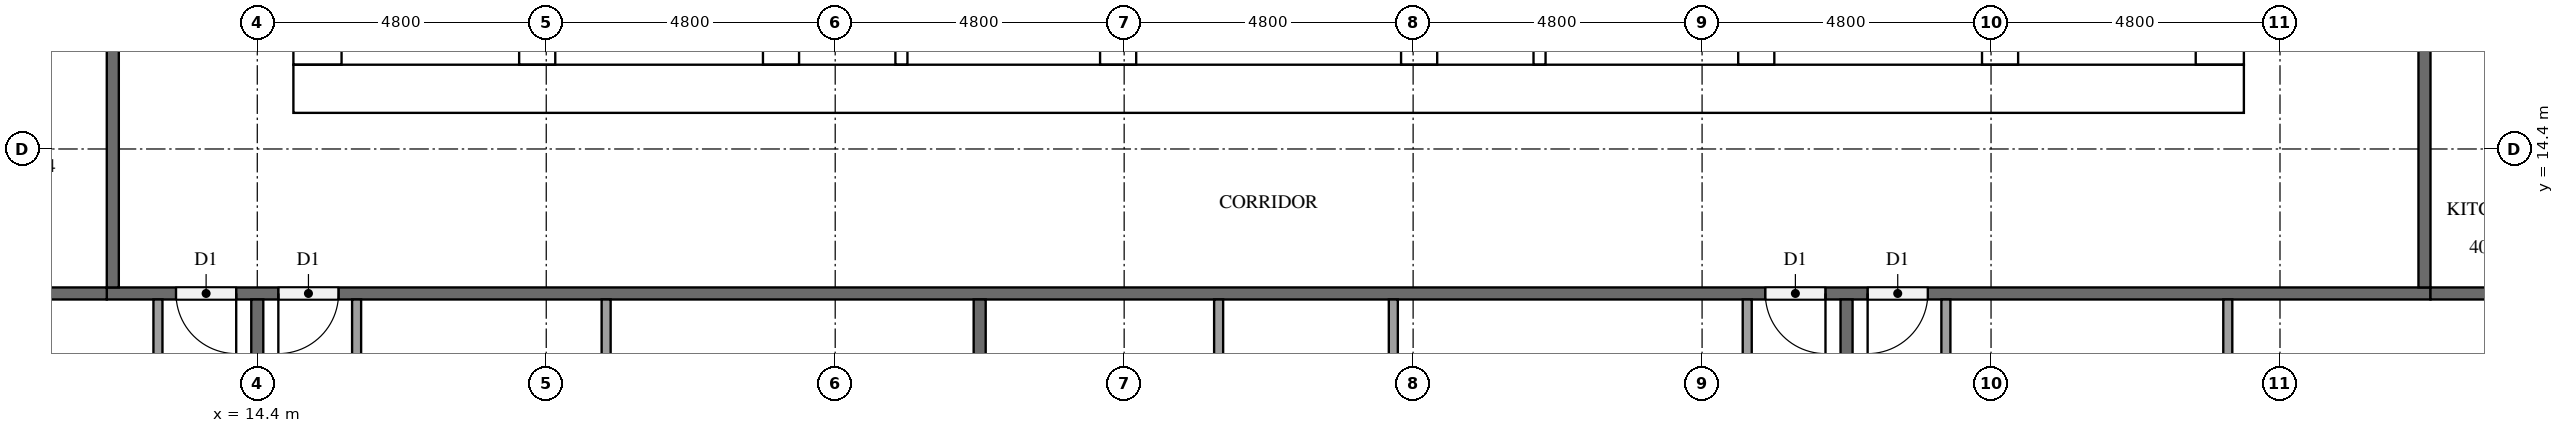
"""IFC4 building model, lengths in metres.
Left out: names, types, materials, properties, quantities, classifications, styles, units other than length and angle.
Written with IfcOpenShell. Run it as: python <this file> out.ifc"""

import sys

from ifc_helpers import new_model, si_unit, direction, frame, frame_2d, origin, place, context, subcontext, project, spatial, rectangle, extrude, element, fill, save


model = new_model("IFC4")
c1 = context("Model", 3, precision=1e-05, world=origin(), true_north=direction((0.0, 1.0)))
c2 = subcontext(c1, "Body", "Model", "MODEL_VIEW")
j1 = project(units=[si_unit("LENGTHUNIT", "METRE"), si_unit("PLANEANGLEUNIT", "RADIAN")], contexts=[c1])
p1 = place(None, origin())
s1 = spatial("IfcSite", under=j1, at=p1, CompositionType="ELEMENT")
p2 = place(p1, origin())
s2 = spatial("IfcBuilding", under=s1, at=p2, CompositionType="ELEMENT")
p3 = place(p2, frame((0.0, 0.0, 156.0)))
s3 = spatial("IfcBuildingStorey", under=s2, at=p3, CompositionType="ELEMENT", Elevation=156.0)
p4 = place(p3, frame((15.0, 15.4, 0.0), z_axis=(0.0, 0.0, 1.0), x_axis=(1.0, 0.0, 0.0)))
e1 = element("IfcWall", 1, at=p4, inside=s3, PredefinedType="SHEAR", context=c2, shape_type="SweptSolid", body=[
    extrude(rectangle(XDim=32.4, YDim=0.8, at=frame_2d((16.2, 0.0))), origin(), (0.0, 0.0, 1.0), 3.2),
])
p5 = place(p4, frame((15.3, 0.0, 0.0)))
e2 = element("IfcOpeningElement", 2, at=p5, cuts=e1, PredefinedType="OPENING", context=c2, shape_type="SweptSolid", body=[
    extrude(rectangle(XDim=1.8, YDim=2.1, at=frame_2d((0.9, 1.05))), frame((0.0, 0.41, 0.0), z_axis=(0.0, -1.0, 0.0), x_axis=(1.0, 0.0, 0.0)), (0.0, 0.0, 1.0), 0.82),
])
p6 = place(p3, frame((15.4, 15.8, 0.0), z_axis=(0.0, 0.0, 1.0), x_axis=(0.0, 1.0, 0.0)))
e3 = element("IfcWall", 3, at=p6, inside=s3, PredefinedType="SHEAR", context=c2, shape_type="SweptSolid", body=[
    extrude(rectangle(XDim=21.2, YDim=0.8, at=frame_2d((10.6, 0.0))), origin(), (0.0, 0.0, 1.0), 3.2),
])
p7 = place(p6, frame((4.96, 0.0, 0.0)))
e4 = element("IfcOpeningElement", 4, at=p7, cuts=e3, PredefinedType="OPENING", context=c2, shape_type="SweptSolid", body=[
    extrude(rectangle(XDim=1.2, YDim=2.1, at=frame_2d((0.6, 1.05))), frame((0.0, 0.41, 0.0), z_axis=(0.0, -1.0, 0.0), x_axis=(1.0, 0.0, 0.0)), (0.0, 0.0, 1.0), 0.82),
])
p8 = place(p3, frame((47.0, 15.8, 0.0), z_axis=(0.0, 0.0, 1.0), x_axis=(0.0, 1.0, 0.0)))
e5 = element("IfcWall", 5, at=p8, inside=s3, PredefinedType="SHEAR", context=c2, shape_type="SweptSolid", body=[
    extrude(rectangle(XDim=21.2, YDim=0.8, at=frame_2d((10.6, 0.0))), origin(), (0.0, 0.0, 1.0), 3.2),
])
p9 = place(p8, frame((10.3, 0.0, 0.0)))
e6 = element("IfcOpeningElement", 6, at=p9, cuts=e5, PredefinedType="OPENING", context=c2, shape_type="SweptSolid", body=[
    extrude(rectangle(XDim=1.2, YDim=2.1, at=frame_2d((0.6, 1.05))), frame((0.0, 0.41, 0.0), z_axis=(0.0, -1.0, 0.0), x_axis=(1.0, 0.0, 0.0)), (0.0, 0.0, 1.0), 0.82),
])
p10 = place(p3, frame((19.05, 15.8, 0.0), z_axis=(0.0, 0.0, 1.0), x_axis=(0.0, 1.0, 0.0)))
e7 = element("IfcWall", 7, at=p10, inside=s3, PredefinedType="SHEAR", context=c2, shape_type="SweptSolid", body=[
    extrude(rectangle(XDim=15.15, YDim=0.6, at=frame_2d((7.575, 0.0))), origin(), (0.0, 0.0, 1.0), 3.2),
])
p11 = place(p10, frame((9.65, 0.0, 0.0)))
e8 = element("IfcOpeningElement", 8, at=p11, cuts=e7, PredefinedType="OPENING", context=c2, shape_type="SweptSolid", body=[
    extrude(rectangle(XDim=1.1, YDim=2.1, at=frame_2d((0.55, 1.05))), frame((0.0, 0.31, 0.0), z_axis=(0.0, -1.0, 0.0), x_axis=(1.0, 0.0, 0.0)), (0.0, 0.0, 1.0), 0.62),
])
p12 = place(p10, frame((13.15, 0.0, 0.0)))
e9 = element("IfcOpeningElement", 9, at=p12, cuts=e7, PredefinedType="OPENING", context=c2, shape_type="SweptSolid", body=[
    extrude(rectangle(XDim=1.1, YDim=2.1, at=frame_2d((0.55, 1.05))), frame((0.0, 0.31, 0.0), z_axis=(0.0, -1.0, 0.0), x_axis=(1.0, 0.0, 0.0)), (0.0, 0.0, 1.0), 0.62),
])
p13 = place(p10, frame((0.4, 0.0, 0.0)))
e10 = element("IfcOpeningElement", 10, at=p13, cuts=e7, PredefinedType="OPENING", context=c2, shape_type="SweptSolid", body=[
    extrude(rectangle(XDim=1.2, YDim=2.1, at=frame_2d((0.6, 1.05))), frame((0.0, 0.31, 0.0), z_axis=(0.0, -1.0, 0.0), x_axis=(1.0, 0.0, 0.0)), (0.0, 0.0, 1.0), 0.62),
])
p14 = place(p3, frame((23.1, 15.8, 0.0), z_axis=(0.0, 0.0, 1.0), x_axis=(0.0, 1.0, 0.0)))
e11 = element("IfcWall", 11, at=p14, inside=s3, PredefinedType="SHEAR", context=c2, shape_type="SweptSolid", body=[
    extrude(rectangle(XDim=21.2, YDim=0.6, at=frame_2d((10.6, 0.0))), origin(), (0.0, 0.0, 1.0), 3.2),
])
p15 = place(p3, frame((39.3, 15.8, 0.0), z_axis=(0.0, 0.0, 1.0), x_axis=(0.0, 1.0, 0.0)))
e12 = element("IfcWall", 12, at=p15, inside=s3, PredefinedType="SHEAR", context=c2, shape_type="SweptSolid", body=[
    extrude(rectangle(XDim=8.45, YDim=0.6, at=frame_2d((4.225, 0.0))), origin(), (0.0, 0.0, 1.0), 3.2),
])
p16 = place(p3, frame((43.35, 15.8, 0.0), z_axis=(0.0, 0.0, 1.0), x_axis=(0.0, 1.0, 0.0)))
e13 = element("IfcWall", 13, at=p16, inside=s3, PredefinedType="SHEAR", context=c2, shape_type="SweptSolid", body=[
    extrude(rectangle(XDim=8.45, YDim=0.6, at=frame_2d((4.225, 0.0))), origin(), (0.0, 0.0, 1.0), 3.2),
])
p17 = place(p16, frame((0.4, 0.0, 0.0)))
e14 = element("IfcOpeningElement", 14, at=p17, cuts=e13, PredefinedType="OPENING", context=c2, shape_type="SweptSolid", body=[
    extrude(rectangle(XDim=1.2, YDim=2.1, at=frame_2d((0.6, 1.05))), frame((0.0, 0.31, 0.0), z_axis=(0.0, -1.0, 0.0), x_axis=(1.0, 0.0, 0.0)), (0.0, 0.0, 1.0), 0.62),
])
for number, where, z_axis, x_axis in (
    (15, (28.7, 15.8, 0.0), (0.0, 0.0, 1.0), (0.0, 1.0, 0.0)),
    (16, (33.7, 15.8, 0.0), (0.0, 0.0, 1.0), (0.0, 1.0, 0.0)),
):
    element("IfcWall", number, at=place(p3, frame(where, z_axis=z_axis, x_axis=x_axis)), inside=s3, PredefinedType="SHEAR", context=c2, shape_type="SweptSolid", body=[
        extrude(rectangle(XDim=2.65, YDim=0.6, at=frame_2d((1.325, 0.0))), origin(), (0.0, 0.0, 1.0), 3.2),
    ])
for number, where, z_axis, x_axis in (
    (17, (25.1, 15.8, 0.0), (0.0, 0.0, 1.0), (0.0, 1.0, 0.0)),
    (18, (35.7, 15.8, 0.0), (0.0, 0.0, 1.0), (0.0, 1.0, 0.0)),
):
    element("IfcWall", number, at=place(p3, frame(where, z_axis=z_axis, x_axis=x_axis)), inside=s3, PredefinedType="PARTITIONING", context=c2, shape_type="SweptSolid", body=[
        extrude(rectangle(XDim=2.65, YDim=0.2, at=frame_2d((1.325, 0.0))), origin(), (0.0, 0.0, 1.0), 3.2),
    ])
p18 = place(p3, frame((50.5, 12.0, 0.0), z_axis=(0.0, 0.0, 1.0), x_axis=(-1.0, 0.0, 0.0)))
e19 = element("IfcWall", 19, at=p18, inside=s3, PredefinedType="PARTITIONING", context=c2, shape_type="SweptSolid", body=[
    extrude(rectangle(XDim=38.6, YDim=0.2, at=frame_2d((19.3, 0.0))), origin(), (0.0, 0.0, 1.0), 3.2),
])
p19 = place(p18, frame((36.45, 0.0, 0.0)))
e20 = element("IfcOpeningElement", 20, at=p19, cuts=e19, PredefinedType="OPENING", context=c2, shape_type="SweptSolid", body=[
    extrude(rectangle(XDim=1.0, YDim=2.1, at=frame_2d((0.5, 1.05))), frame((0.0, 0.11, 0.0), z_axis=(0.0, -1.0, 0.0), x_axis=(1.0, 0.0, 0.0)), (0.0, 0.0, 1.0), 0.22),
])
p20 = place(p18, frame((34.75, 0.0, 0.0)))
e21 = element("IfcOpeningElement", 21, at=p20, cuts=e19, PredefinedType="OPENING", context=c2, shape_type="SweptSolid", body=[
    extrude(rectangle(XDim=1.0, YDim=2.1, at=frame_2d((0.5, 1.05))), frame((0.0, 0.11, 0.0), z_axis=(0.0, -1.0, 0.0), x_axis=(1.0, 0.0, 0.0)), (0.0, 0.0, 1.0), 0.22),
])
p21 = place(p18, frame((10.05, 0.0, 0.0)))
e22 = element("IfcOpeningElement", 22, at=p21, cuts=e19, PredefinedType="OPENING", context=c2, shape_type="SweptSolid", body=[
    extrude(rectangle(XDim=1.0, YDim=2.1, at=frame_2d((0.5, 1.05))), frame((0.0, 0.11, 0.0), z_axis=(0.0, -1.0, 0.0), x_axis=(1.0, 0.0, 0.0)), (0.0, 0.0, 1.0), 0.22),
])
p22 = place(p18, frame((8.35, 0.0, 0.0)))
e23 = element("IfcOpeningElement", 23, at=p22, cuts=e19, PredefinedType="OPENING", context=c2, shape_type="SweptSolid", body=[
    extrude(rectangle(XDim=1.0, YDim=2.1, at=frame_2d((0.5, 1.05))), frame((0.0, 0.11, 0.0), z_axis=(0.0, -1.0, 0.0), x_axis=(1.0, 0.0, 0.0)), (0.0, 0.0, 1.0), 0.22),
])
p23 = place(p3, frame((50.4, 40.7, 0.0), z_axis=(0.0, 0.0, 1.0), x_axis=(0.0, -1.0, 0.0)))
e24 = element("IfcWall", 24, at=p23, inside=s3, PredefinedType="PARTITIONING", context=c2, shape_type="SweptSolid", body=[
    extrude(rectangle(XDim=28.6, YDim=0.2, at=frame_2d((14.3, 0.0))), origin(), (0.0, 0.0, 1.0), 3.2),
])
p24 = place(p23, frame((17.05, 0.0, 0.0)))
e25 = element("IfcOpeningElement", 25, at=p24, cuts=e24, PredefinedType="OPENING", context=c2, shape_type="SweptSolid", body=[
    extrude(rectangle(XDim=1.0, YDim=2.1, at=frame_2d((0.5, 1.05))), frame((0.0, 0.11, 0.0), z_axis=(0.0, -1.0, 0.0), x_axis=(1.0, 0.0, 0.0)), (0.0, 0.0, 1.0), 0.22),
])
p25 = place(p23, frame((15.35, 0.0, 0.0)))
e26 = element("IfcOpeningElement", 26, at=p25, cuts=e24, PredefinedType="OPENING", context=c2, shape_type="SweptSolid", body=[
    extrude(rectangle(XDim=1.0, YDim=2.1, at=frame_2d((0.5, 1.05))), frame((0.0, 0.11, 0.0), z_axis=(0.0, -1.0, 0.0), x_axis=(1.0, 0.0, 0.0)), (0.0, 0.0, 1.0), 0.22),
])
p26 = place(p23, frame((5.75, 0.0, 0.0)))
e27 = element("IfcOpeningElement", 27, at=p26, cuts=e24, PredefinedType="OPENING", context=c2, shape_type="SweptSolid", body=[
    extrude(rectangle(XDim=1.0, YDim=2.1, at=frame_2d((0.5, 1.05))), frame((0.0, 0.11, 0.0), z_axis=(0.0, -1.0, 0.0), x_axis=(1.0, 0.0, 0.0)), (0.0, 0.0, 1.0), 0.22),
])
p27 = place(p3, frame((12.0, 12.1, 0.0), z_axis=(0.0, 0.0, 1.0), x_axis=(0.0, 1.0, 0.0)))
e28 = element("IfcWall", 28, at=p27, inside=s3, PredefinedType="PARTITIONING", context=c2, shape_type="SweptSolid", body=[
    extrude(rectangle(XDim=28.6, YDim=0.2, at=frame_2d((14.3, 0.0))), origin(), (0.0, 0.0, 1.0), 3.2),
])
p28 = place(p27, frame((27.35, 0.0, 0.0)))
e29 = element("IfcOpeningElement", 29, at=p28, cuts=e28, PredefinedType="OPENING", context=c2, shape_type="SweptSolid", body=[
    extrude(rectangle(XDim=1.0, YDim=2.1, at=frame_2d((0.5, 1.05))), frame((0.0, 0.11, 0.0), z_axis=(0.0, -1.0, 0.0), x_axis=(1.0, 0.0, 0.0)), (0.0, 0.0, 1.0), 0.22),
])
p29 = place(p27, frame((20.15, 0.0, 0.0)))
e30 = element("IfcOpeningElement", 30, at=p29, cuts=e28, PredefinedType="OPENING", context=c2, shape_type="SweptSolid", body=[
    extrude(rectangle(XDim=1.0, YDim=2.1, at=frame_2d((0.5, 1.05))), frame((0.0, 0.11, 0.0), z_axis=(0.0, -1.0, 0.0), x_axis=(1.0, 0.0, 0.0)), (0.0, 0.0, 1.0), 0.22),
])
p30 = place(p27, frame((10.55, 0.0, 0.0)))
e31 = element("IfcOpeningElement", 31, at=p30, cuts=e28, PredefinedType="OPENING", context=c2, shape_type="SweptSolid", body=[
    extrude(rectangle(XDim=1.0, YDim=2.1, at=frame_2d((0.5, 1.05))), frame((0.0, 0.11, 0.0), z_axis=(0.0, -1.0, 0.0), x_axis=(1.0, 0.0, 0.0)), (0.0, 0.0, 1.0), 0.22),
])
p31 = place(p3, frame((14.4, 11.9, 0.0), z_axis=(0.0, 0.0, 1.0), x_axis=(0.0, -1.0, 0.0)))
e32 = element("IfcWall", 32, at=p31, inside=s3, PredefinedType="PARTITIONING", context=c2, shape_type="SweptSolid", body=[
    extrude(rectangle(XDim=11.525, YDim=0.2, at=frame_2d((5.762, 0.0))), origin(), (0.0, 0.0, 1.0), 3.2),
])
for number, where, z_axis, x_axis in (
    (33, (0.1, 12.0, 0.0), (0.0, 0.0, 1.0), (1.0, 0.0, 0.0)),
    (34, (26.4, 11.9, 0.0), (0.0, 0.0, 1.0), (0.0, -1.0, 0.0)),
    (35, (40.8, 11.9, 0.0), (0.0, 0.0, 1.0), (0.0, -1.0, 0.0)),
):
    element("IfcWall", number, at=place(p3, frame(where, z_axis=z_axis, x_axis=x_axis)), inside=s3, PredefinedType="PARTITIONING", context=c2, shape_type="SweptSolid", body=[
        extrude(rectangle(XDim=11.8, YDim=0.2, at=frame_2d((5.9, 0.0))), origin(), (0.0, 0.0, 1.0), 3.2),
    ])
p32 = place(p3, frame((50.5, 12.0, 0.0), z_axis=(0.0, 0.0, 1.0), x_axis=(1.0, 0.0, 0.0)))
e36 = element("IfcWall", 36, at=p32, inside=s3, PredefinedType="PARTITIONING", context=c2, shape_type="SweptSolid", body=[
    extrude(rectangle(XDim=7.0, YDim=0.2, at=frame_2d((3.5, 0.0))), origin(), (0.0, 0.0, 1.0), 3.2),
])
p33 = place(p3, frame((12.75, 11.9, 0.0), z_axis=(0.0, 0.0, 1.0), x_axis=(0.0, -1.0, 0.0)))
e37 = element("IfcWall", 37, at=p33, inside=s3, PredefinedType="PARTITIONING", context=c2, shape_type="SweptSolid", body=[
    extrude(rectangle(XDim=3.125, YDim=0.15, at=frame_2d((1.562, 0.0))), origin(), (0.0, 0.0, 1.0), 3.2),
])
p34 = place(p3, frame((20.195, 11.9, 0.0), z_axis=(0.0, 0.0, 1.0), x_axis=(0.0, -1.0, 0.0)))
e38 = element("IfcWall", 38, at=p34, inside=s3, PredefinedType="PARTITIONING", context=c2, shape_type="SweptSolid", body=[
    extrude(rectangle(XDim=2.975, YDim=0.15, at=frame_2d((1.487, 0.0))), origin(), (0.0, 0.0, 1.0), 3.2),
])
p35 = place(p3, frame((16.05, 11.9, 0.0), z_axis=(0.0, 0.0, 1.0), x_axis=(0.0, -1.0, 0.0)))
e39 = element("IfcWall", 39, at=p35, inside=s3, PredefinedType="PARTITIONING", context=c2, shape_type="SweptSolid", body=[
    extrude(rectangle(XDim=3.125, YDim=0.15, at=frame_2d((1.562, 0.0))), origin(), (0.0, 0.0, 1.0), 3.2),
])
for number, where, z_axis, x_axis in (
    (40, (33.271, 11.9, 0.0), (0.0, 0.0, 1.0), (0.0, -1.0, 0.0)),
    (41, (30.369, 11.9, 0.0), (0.0, 0.0, 1.0), (0.0, -1.0, 0.0)),
):
    element("IfcWall", number, at=place(p3, frame(where, z_axis=z_axis, x_axis=x_axis)), inside=s3, PredefinedType="PARTITIONING", context=c2, shape_type="SweptSolid", body=[
        extrude(rectangle(XDim=3.875, YDim=0.15, at=frame_2d((1.938, 0.0))), origin(), (0.0, 0.0, 1.0), 3.2),
    ])
p36 = place(p3, frame((39.15, 11.9, 0.0), z_axis=(0.0, 0.0, 1.0), x_axis=(0.0, -1.0, 0.0)))
e42 = element("IfcWall", 42, at=p36, inside=s3, PredefinedType="PARTITIONING", context=c2, shape_type="SweptSolid", body=[
    extrude(rectangle(XDim=4.025, YDim=0.15, at=frame_2d((2.012, 0.0))), origin(), (0.0, 0.0, 1.0), 3.2),
])
p37 = place(p3, frame((47.133, 11.9, 0.0), z_axis=(0.0, 0.0, 1.0), x_axis=(0.0, -1.0, 0.0)))
e43 = element("IfcWall", 43, at=p37, inside=s3, PredefinedType="PARTITIONING", context=c2, shape_type="SweptSolid", body=[
    extrude(rectangle(XDim=4.175, YDim=0.15, at=frame_2d((2.087, 0.0))), origin(), (0.0, 0.0, 1.0), 3.2),
])
p38 = place(p3, frame((42.45, 11.9, 0.0), z_axis=(0.0, 0.0, 1.0), x_axis=(0.0, -1.0, 0.0)))
e44 = element("IfcWall", 44, at=p38, inside=s3, PredefinedType="PARTITIONING", context=c2, shape_type="SweptSolid", body=[
    extrude(rectangle(XDim=4.325, YDim=0.15, at=frame_2d((2.163, 0.0))), origin(), (0.0, 0.0, 1.0), 3.2),
])
p39 = place(p5, frame((1.8, 0.0, 0.0), z_axis=(0.0, 0.0, 1.0), x_axis=(-1.0, 0.0, 0.0)))
e45 = element("IfcDoor", 45, at=p39, inside=s3, OperationType="DOUBLE_DOOR_SINGLE_SWING", PredefinedType="DOOR", context=c2, shape_type="SweptSolid", body=[
    extrude(rectangle(XDim=1.8, YDim=2.1, at=frame_2d((0.9, 1.05))), frame((0.0, 0.025, 0.0), z_axis=(0.0, -1.0, 0.0), x_axis=(1.0, 0.0, 0.0)), (0.0, 0.0, 1.0), 0.05),
])
fill(e2, e45)
p40 = place(p19, origin())
e46 = element("IfcDoor", 46, at=p40, inside=s3, OperationType="SINGLE_SWING_LEFT", PredefinedType="DOOR", context=c2, shape_type="SweptSolid", body=[
    extrude(rectangle(XDim=1.0, YDim=2.1, at=frame_2d((0.5, 1.05))), frame((0.0, 0.025, 0.0), z_axis=(0.0, -1.0, 0.0), x_axis=(1.0, 0.0, 0.0)), (0.0, 0.0, 1.0), 0.05),
])
fill(e20, e46)
p41 = place(p20, origin())
e47 = element("IfcDoor", 47, at=p41, inside=s3, OperationType="SINGLE_SWING_RIGHT", PredefinedType="DOOR", context=c2, shape_type="SweptSolid", body=[
    extrude(rectangle(XDim=1.0, YDim=2.1, at=frame_2d((0.5, 1.05))), frame((0.0, 0.025, 0.0), z_axis=(0.0, -1.0, 0.0), x_axis=(1.0, 0.0, 0.0)), (0.0, 0.0, 1.0), 0.05),
])
fill(e21, e47)
p42 = place(p21, origin())
e48 = element("IfcDoor", 48, at=p42, inside=s3, OperationType="SINGLE_SWING_LEFT", PredefinedType="DOOR", context=c2, shape_type="SweptSolid", body=[
    extrude(rectangle(XDim=1.0, YDim=2.1, at=frame_2d((0.5, 1.05))), frame((0.0, 0.025, 0.0), z_axis=(0.0, -1.0, 0.0), x_axis=(1.0, 0.0, 0.0)), (0.0, 0.0, 1.0), 0.05),
])
fill(e22, e48)
p43 = place(p22, origin())
e49 = element("IfcDoor", 49, at=p43, inside=s3, OperationType="SINGLE_SWING_RIGHT", PredefinedType="DOOR", context=c2, shape_type="SweptSolid", body=[
    extrude(rectangle(XDim=1.0, YDim=2.1, at=frame_2d((0.5, 1.05))), frame((0.0, 0.025, 0.0), z_axis=(0.0, -1.0, 0.0), x_axis=(1.0, 0.0, 0.0)), (0.0, 0.0, 1.0), 0.05),
])
fill(e23, e49)
save(model, sys.argv[1])
